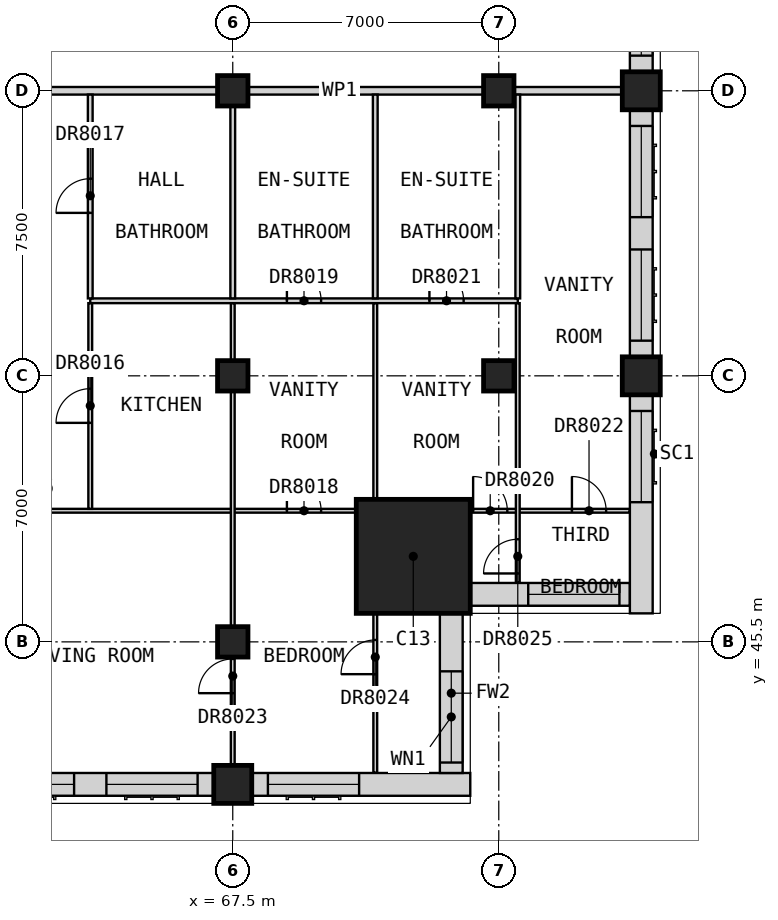
"""IFC4 building model, lengths in metres.
Left out: names, types, materials, properties, quantities, classifications, styles, units other than length and angle.
Written with IfcOpenShell. Run it as: python <this file> out.ifc"""

import sys

from ifc_helpers import new_model, si_unit, direction, frame, frame_2d, origin, origin_2d, place, context, subcontext, project, spatial, rectangle, extrude, element, fill, save


model = new_model("IFC4")
c1 = context("Model", 3, precision=1e-05, world=origin(), true_north=direction((0.0, 1.0)))
c2 = subcontext(c1, "Body", "Model", "MODEL_VIEW")
j1 = project(units=[si_unit("LENGTHUNIT", "METRE"), si_unit("PLANEANGLEUNIT", "RADIAN")], contexts=[c1])
p1 = place(None, origin())
s1 = spatial("IfcSite", under=j1, at=p1, CompositionType="ELEMENT")
p2 = place(p1, origin())
s2 = spatial("IfcBuilding", under=s1, at=p2, CompositionType="ELEMENT")
p3 = place(p2, frame((0.0, 0.0, 233.7)))
s3 = spatial("IfcBuildingStorey", under=s2, at=p3, CompositionType="ELEMENT", Elevation=233.7)
for number, where, z_axis, x_axis in (
    (1, (67.5, 41.75, 0.0), (0.0, 0.0, 1.0), (1.0, 0.0, 0.0)),
    (2, (78.25, 52.5, 0.0), (0.0, 0.0, 1.0), (1.0, 0.0, 0.0)),
    (3, (78.25, 60.0, 0.0), (0.0, 0.0, 1.0), (1.0, 0.0, 0.0)),
):
    element("IfcColumn", number, at=place(p3, frame(where, z_axis=z_axis, x_axis=x_axis)), inside=s3, PredefinedType="COLUMN", context=c2, shape_type="SweptSolid", body=[
        extrude(rectangle(XDim=1.0, YDim=1.0, at=origin_2d()), origin(), (0.0, 0.0, 1.0), 3.5),
    ])
for number, where, z_axis, x_axis in (
    (4, (67.5, 45.5, 0.0), (0.0, 0.0, 1.0), (1.0, 0.0, 0.0)),
    (5, (67.5, 52.5, 0.0), (0.0, 0.0, 1.0), (1.0, 0.0, 0.0)),
    (6, (67.5, 60.0, 0.0), (0.0, 0.0, 1.0), (1.0, 0.0, 0.0)),
    (7, (74.5, 52.5, 0.0), (0.0, 0.0, 1.0), (1.0, 0.0, 0.0)),
    (8, (74.5, 60.0, 0.0), (0.0, 0.0, 1.0), (1.0, 0.0, 0.0)),
):
    element("IfcColumn", number, at=place(p3, frame(where, z_axis=z_axis, x_axis=x_axis)), inside=s3, PredefinedType="COLUMN", context=c2, shape_type="SweptSolid", body=[
        extrude(rectangle(XDim=0.8, YDim=0.8, at=origin_2d()), origin(), (0.0, 0.0, 1.0), 3.5),
    ])
p4 = place(p3, frame((72.25, 47.75, 0.0), z_axis=(0.0, 0.0, 1.0), x_axis=(1.0, 0.0, 0.0)))
e9 = element("IfcColumn", 9, at=p4, inside=s3, PredefinedType="COLUMN", context=c2, shape_type="SweptSolid", body=[
    extrude(rectangle(XDim=3.0, YDim=3.0, at=origin_2d()), origin(), (0.0, 0.0, 1.0), 3.5),
])
p5 = place(p3, frame((60.5, 41.75, 0.0), z_axis=(0.0, 0.0, 1.0), x_axis=(1.0, 0.0, 0.0)))
e10 = element("IfcWall", 10, at=p5, inside=s3, PredefinedType="SOLIDWALL", context=c2, shape_type="SweptSolid", body=[
    extrude(rectangle(XDim=6.5, YDim=0.6, at=frame_2d((3.25, 0.0))), origin(), (0.0, 0.0, 1.0), 2.75),
])
p6 = place(p5, frame((0.425, 0.0, 0.8)))
e11 = element("IfcOpeningElement", 11, at=p6, cuts=e10, PredefinedType="OPENING", context=c2, shape_type="SweptSolid", body=[
    extrude(rectangle(XDim=2.4, YDim=1.8, at=frame_2d((1.2, 0.9))), frame((0.0, 0.31, 0.0), z_axis=(0.0, -1.0, 0.0), x_axis=(1.0, 0.0, 0.0)), (0.0, 0.0, 1.0), 0.62),
])
p7 = place(p5, frame((3.675, 0.0, 0.8)))
e12 = element("IfcOpeningElement", 12, at=p7, cuts=e10, PredefinedType="OPENING", context=c2, shape_type="SweptSolid", body=[
    extrude(rectangle(XDim=2.4, YDim=1.8, at=frame_2d((1.2, 0.9))), frame((0.0, 0.31, 0.0), z_axis=(0.0, -1.0, 0.0), x_axis=(1.0, 0.0, 0.0)), (0.0, 0.0, 1.0), 0.62),
])
p8 = place(p3, frame((68.0, 41.75, 0.0), z_axis=(0.0, 0.0, 1.0), x_axis=(1.0, 0.0, 0.0)))
e13 = element("IfcWall", 13, at=p8, inside=s3, PredefinedType="SOLIDWALL", context=c2, shape_type="SweptSolid", body=[
    extrude(rectangle(XDim=5.75, YDim=0.6, at=frame_2d((2.875, 0.0))), origin(), (0.0, 0.0, 1.0), 2.75),
])
p9 = place(p8, frame((0.425, 0.0, 0.8)))
e14 = element("IfcOpeningElement", 14, at=p9, cuts=e13, PredefinedType="OPENING", context=c2, shape_type="SweptSolid", body=[
    extrude(rectangle(XDim=2.4, YDim=1.8, at=frame_2d((1.2, 0.9))), frame((0.0, 0.31, 0.0), z_axis=(0.0, -1.0, 0.0), x_axis=(1.0, 0.0, 0.0)), (0.0, 0.0, 1.0), 0.62),
])
p10 = place(p3, frame((73.25, 42.05, 0.0), z_axis=(0.0, 0.0, 1.0), x_axis=(0.0, 1.0, 0.0)))
e15 = element("IfcWall", 15, at=p10, inside=s3, PredefinedType="SOLIDWALL", context=c2, shape_type="SweptSolid", body=[
    extrude(rectangle(XDim=4.2, YDim=0.6, at=frame_2d((2.1, 0.0))), origin(), (0.0, 0.0, 1.0), 3.25),
])
p11 = place(p10, frame((0.275, 0.0, 0.8)))
e16 = element("IfcOpeningElement", 16, at=p11, cuts=e15, PredefinedType="OPENING", context=c2, shape_type="SweptSolid", body=[
    extrude(rectangle(XDim=2.4, YDim=1.8, at=frame_2d((1.2, 0.9))), frame((0.0, 0.31, 0.0), z_axis=(0.0, -1.0, 0.0), x_axis=(1.0, 0.0, 0.0)), (0.0, 0.0, 1.0), 0.62),
])
p12 = place(p3, frame((73.75, 46.75, 0.0), z_axis=(0.0, 0.0, 1.0), x_axis=(1.0, 0.0, 0.0)))
e17 = element("IfcWall", 17, at=p12, inside=s3, PredefinedType="SOLIDWALL", context=c2, shape_type="SweptSolid", body=[
    extrude(rectangle(XDim=4.2, YDim=0.6, at=frame_2d((2.1, 0.0))), origin(), (0.0, 0.0, 1.0), 3.25),
])
p13 = place(p12, frame((1.525, 0.0, 0.8)))
e18 = element("IfcOpeningElement", 18, at=p13, cuts=e17, PredefinedType="OPENING", context=c2, shape_type="SweptSolid", body=[
    extrude(rectangle(XDim=2.4, YDim=1.8, at=frame_2d((1.2, 0.9))), frame((0.0, 0.31, 0.0), z_axis=(0.0, -1.0, 0.0), x_axis=(1.0, 0.0, 0.0)), (0.0, 0.0, 1.0), 0.62),
])
p14 = place(p3, frame((78.25, 46.25, 0.0), z_axis=(0.0, 0.0, 1.0), x_axis=(0.0, 1.0, 0.0)))
e19 = element("IfcWall", 19, at=p14, inside=s3, PredefinedType="SOLIDWALL", context=c2, shape_type="SweptSolid", body=[
    extrude(rectangle(XDim=5.75, YDim=0.6, at=frame_2d((2.875, 0.0))), origin(), (0.0, 0.0, 1.0), 2.75),
])
p15 = place(p14, frame((2.925, 0.0, 0.8)))
e20 = element("IfcOpeningElement", 20, at=p15, cuts=e19, PredefinedType="OPENING", context=c2, shape_type="SweptSolid", body=[
    extrude(rectangle(XDim=2.4, YDim=1.8, at=frame_2d((1.2, 0.9))), frame((0.0, 0.31, 0.0), z_axis=(0.0, -1.0, 0.0), x_axis=(1.0, 0.0, 0.0)), (0.0, 0.0, 1.0), 0.62),
])
p16 = place(p3, frame((78.25, 53.0, 0.0), z_axis=(0.0, 0.0, 1.0), x_axis=(0.0, 1.0, 0.0)))
e21 = element("IfcWall", 21, at=p16, inside=s3, PredefinedType="SOLIDWALL", context=c2, shape_type="SweptSolid", body=[
    extrude(rectangle(XDim=6.5, YDim=0.6, at=frame_2d((3.25, 0.0))), origin(), (0.0, 0.0, 1.0), 2.75),
])
p17 = place(p16, frame((0.425, 0.0, 0.8)))
e22 = element("IfcOpeningElement", 22, at=p17, cuts=e21, PredefinedType="OPENING", context=c2, shape_type="SweptSolid", body=[
    extrude(rectangle(XDim=2.4, YDim=1.8, at=frame_2d((1.2, 0.9))), frame((0.0, 0.31, 0.0), z_axis=(0.0, -1.0, 0.0), x_axis=(1.0, 0.0, 0.0)), (0.0, 0.0, 1.0), 0.62),
])
p18 = place(p16, frame((3.675, 0.0, 0.8)))
e23 = element("IfcOpeningElement", 23, at=p18, cuts=e21, PredefinedType="OPENING", context=c2, shape_type="SweptSolid", body=[
    extrude(rectangle(XDim=2.4, YDim=1.8, at=frame_2d((1.2, 0.9))), frame((0.0, 0.31, 0.0), z_axis=(0.0, -1.0, 0.0), x_axis=(1.0, 0.0, 0.0)), (0.0, 0.0, 1.0), 0.62),
])
p19 = place(p3, frame((78.25, 60.5, 0.0), z_axis=(0.0, 0.0, 1.0), x_axis=(0.0, 1.0, 0.0)))
e24 = element("IfcWall", 24, at=p19, inside=s3, PredefinedType="SOLIDWALL", context=c2, shape_type="SweptSolid", body=[
    extrude(rectangle(XDim=6.5, YDim=0.6, at=frame_2d((3.25, 0.0))), origin(), (0.0, 0.0, 1.0), 2.75),
])
p20 = place(p19, frame((0.425, 0.0, 0.8)))
e25 = element("IfcOpeningElement", 25, at=p20, cuts=e24, PredefinedType="OPENING", context=c2, shape_type="SweptSolid", body=[
    extrude(rectangle(XDim=2.4, YDim=1.8, at=frame_2d((1.2, 0.9))), frame((0.0, 0.31, 0.0), z_axis=(0.0, -1.0, 0.0), x_axis=(1.0, 0.0, 0.0)), (0.0, 0.0, 1.0), 0.62),
])
p21 = place(p19, frame((3.675, 0.0, 0.8)))
e26 = element("IfcOpeningElement", 26, at=p21, cuts=e24, PredefinedType="OPENING", context=c2, shape_type="SweptSolid", body=[
    extrude(rectangle(XDim=2.4, YDim=1.8, at=frame_2d((1.2, 0.9))), frame((0.0, 0.31, 0.0), z_axis=(0.0, -1.0, 0.0), x_axis=(1.0, 0.0, 0.0)), (0.0, 0.0, 1.0), 0.62),
])
p22 = place(p3, frame((61.875, 60.0, 0.0), z_axis=(0.0, 0.0, 1.0), x_axis=(1.0, 0.0, 0.0)))
e27 = element("IfcWall", 27, at=p22, inside=s3, PredefinedType="PARTITIONING", context=c2, shape_type="SweptSolid", body=[
    extrude(rectangle(XDim=16.875, YDim=0.2, at=frame_2d((8.438, 0.0))), origin(), (0.0, 0.0, 1.0), 3.25),
])
p23 = place(p3, frame((60.1, 48.95, 0.0), z_axis=(0.0, 0.0, 1.0), x_axis=(1.0, 0.0, 0.0)))
e28 = element("IfcWall", 28, at=p23, inside=s3, PredefinedType="PARTITIONING", context=c2, shape_type="SweptSolid", body=[
    extrude(rectangle(XDim=17.84, YDim=0.1, at=frame_2d((8.92, 0.0))), origin(), (0.0, 0.0, 1.0), 3.25),
])
p24 = place(p23, frame((1.325, 0.0, 0.0)))
e29 = element("IfcOpeningElement", 29, at=p24, cuts=e28, PredefinedType="OPENING", context=c2, shape_type="SweptSolid", body=[
    extrude(rectangle(XDim=0.9, YDim=2.1, at=frame_2d((0.45, 1.05))), frame((0.0, 0.06, 0.0), z_axis=(0.0, -1.0, 0.0), x_axis=(1.0, 0.0, 0.0)), (0.0, 0.0, 1.0), 0.12),
])
p25 = place(p23, frame((8.825, 0.0, 0.0)))
e30 = element("IfcOpeningElement", 30, at=p25, cuts=e28, PredefinedType="OPENING", context=c2, shape_type="SweptSolid", body=[
    extrude(rectangle(XDim=0.9, YDim=2.1, at=frame_2d((0.45, 1.05))), frame((0.0, 0.06, 0.0), z_axis=(0.0, -1.0, 0.0), x_axis=(1.0, 0.0, 0.0)), (0.0, 0.0, 1.0), 0.12),
])
p26 = place(p23, frame((13.725, 0.0, 0.0)))
e31 = element("IfcOpeningElement", 31, at=p26, cuts=e28, PredefinedType="OPENING", context=c2, shape_type="SweptSolid", body=[
    extrude(rectangle(XDim=0.9, YDim=2.1, at=frame_2d((0.45, 1.05))), frame((0.0, 0.06, 0.0), z_axis=(0.0, -1.0, 0.0), x_axis=(1.0, 0.0, 0.0)), (0.0, 0.0, 1.0), 0.12),
])
p27 = place(p23, frame((16.325, 0.0, 0.0)))
e32 = element("IfcOpeningElement", 32, at=p27, cuts=e28, PredefinedType="OPENING", context=c2, shape_type="SweptSolid", body=[
    extrude(rectangle(XDim=0.9, YDim=2.1, at=frame_2d((0.45, 1.05))), frame((0.0, 0.06, 0.0), z_axis=(0.0, -1.0, 0.0), x_axis=(1.0, 0.0, 0.0)), (0.0, 0.0, 1.0), 0.12),
])
p28 = place(p3, frame((63.75, 49.0, 0.0), z_axis=(0.0, 0.0, 1.0), x_axis=(0.0, 1.0, 0.0)))
e33 = element("IfcWall", 33, at=p28, inside=s3, PredefinedType="PARTITIONING", context=c2, shape_type="SweptSolid", body=[
    extrude(rectangle(XDim=5.413, YDim=0.1, at=frame_2d((2.706, 0.0))), origin(), (0.0, 0.0, 1.0), 3.25),
])
p29 = place(p28, frame((2.262, 0.0, 0.0)))
e34 = element("IfcOpeningElement", 34, at=p29, cuts=e33, PredefinedType="OPENING", context=c2, shape_type="SweptSolid", body=[
    extrude(rectangle(XDim=0.9, YDim=2.1, at=frame_2d((0.45, 1.05))), frame((0.0, 0.06, 0.0), z_axis=(0.0, -1.0, 0.0), x_axis=(1.0, 0.0, 0.0)), (0.0, 0.0, 1.0), 0.12),
])
p30 = place(p3, frame((67.5, 41.25, 0.0), z_axis=(0.0, 0.0, 1.0), x_axis=(0.0, 1.0, 0.0)))
e35 = element("IfcWall", 35, at=p30, inside=s3, PredefinedType="PARTITIONING", context=c2, shape_type="SweptSolid", body=[
    extrude(rectangle(XDim=13.163, YDim=0.1, at=frame_2d((6.581, 0.0))), origin(), (0.0, 0.0, 1.0), 3.25),
])
p31 = place(p30, frame((2.9, 0.0, 0.0)))
e36 = element("IfcOpeningElement", 36, at=p31, cuts=e35, PredefinedType="OPENING", context=c2, shape_type="SweptSolid", body=[
    extrude(rectangle(XDim=0.9, YDim=2.1, at=frame_2d((0.45, 1.05))), frame((0.0, 0.06, 0.0), z_axis=(0.0, -1.0, 0.0), x_axis=(1.0, 0.0, 0.0)), (0.0, 0.0, 1.0), 0.12),
])
p32 = place(p3, frame((71.25, 42.06, 0.0), z_axis=(0.0, 0.0, 1.0), x_axis=(0.0, 1.0, 0.0)))
e37 = element("IfcWall", 37, at=p32, inside=s3, PredefinedType="PARTITIONING", context=c2, shape_type="SweptSolid", body=[
    extrude(rectangle(XDim=12.353, YDim=0.1, at=frame_2d((6.176, 0.0))), origin(), (0.0, 0.0, 1.0), 3.25),
])
p33 = place(p32, frame((2.59, 0.0, 0.0)))
e38 = element("IfcOpeningElement", 38, at=p33, cuts=e37, PredefinedType="OPENING", context=c2, shape_type="SweptSolid", body=[
    extrude(rectangle(XDim=0.9, YDim=2.1, at=frame_2d((0.45, 1.05))), frame((0.0, 0.06, 0.0), z_axis=(0.0, -1.0, 0.0), x_axis=(1.0, 0.0, 0.0)), (0.0, 0.0, 1.0), 0.12),
])
p34 = place(p3, frame((75.0, 47.06, 0.0), z_axis=(0.0, 0.0, 1.0), x_axis=(0.0, 1.0, 0.0)))
e39 = element("IfcWall", 39, at=p34, inside=s3, PredefinedType="PARTITIONING", context=c2, shape_type="SweptSolid", body=[
    extrude(rectangle(XDim=7.353, YDim=0.1, at=frame_2d((3.676, 0.0))), origin(), (0.0, 0.0, 1.0), 3.25),
])
p35 = place(p34, frame((0.24, 0.0, 0.0)))
e40 = element("IfcOpeningElement", 40, at=p35, cuts=e39, PredefinedType="OPENING", context=c2, shape_type="SweptSolid", body=[
    extrude(rectangle(XDim=0.9, YDim=2.1, at=frame_2d((0.45, 1.05))), frame((0.0, 0.06, 0.0), z_axis=(0.0, -1.0, 0.0), x_axis=(1.0, 0.0, 0.0)), (0.0, 0.0, 1.0), 0.12),
])
p36 = place(p3, frame((63.75, 54.475, 0.0), z_axis=(0.0, 0.0, 1.0), x_axis=(1.0, 0.0, 0.0)))
e41 = element("IfcWall", 41, at=p36, inside=s3, PredefinedType="PARTITIONING", context=c2, shape_type="SweptSolid", body=[
    extrude(rectangle(XDim=11.25, YDim=0.125, at=frame_2d((5.625, 0.0))), origin(), (0.0, 0.0, 1.0), 3.25),
])
p37 = place(p36, frame((5.175, 0.0, 0.0)))
e42 = element("IfcOpeningElement", 42, at=p37, cuts=e41, PredefinedType="OPENING", context=c2, shape_type="SweptSolid", body=[
    extrude(rectangle(XDim=0.9, YDim=2.1, at=frame_2d((0.45, 1.05))), frame((0.0, 0.073, 0.0), z_axis=(0.0, -1.0, 0.0), x_axis=(1.0, 0.0, 0.0)), (0.0, 0.0, 1.0), 0.145),
])
p38 = place(p36, frame((8.925, 0.0, 0.0)))
e43 = element("IfcOpeningElement", 43, at=p38, cuts=e41, PredefinedType="OPENING", context=c2, shape_type="SweptSolid", body=[
    extrude(rectangle(XDim=0.9, YDim=2.1, at=frame_2d((0.45, 1.05))), frame((0.0, 0.073, 0.0), z_axis=(0.0, -1.0, 0.0), x_axis=(1.0, 0.0, 0.0)), (0.0, 0.0, 1.0), 0.145),
])
p39 = place(p3, frame((63.75, 54.538, 0.0), z_axis=(0.0, 0.0, 1.0), x_axis=(0.0, 1.0, 0.0)))
e44 = element("IfcWall", 44, at=p39, inside=s3, PredefinedType="PARTITIONING", context=c2, shape_type="SweptSolid", body=[
    extrude(rectangle(XDim=5.362, YDim=0.125, at=frame_2d((2.681, 0.0))), origin(), (0.0, 0.0, 1.0), 3.25),
])
p40 = place(p39, frame((2.25, 0.0, 0.0)))
e45 = element("IfcOpeningElement", 45, at=p40, cuts=e44, PredefinedType="OPENING", context=c2, shape_type="SweptSolid", body=[
    extrude(rectangle(XDim=0.9, YDim=2.1, at=frame_2d((0.45, 1.05))), frame((0.0, 0.073, 0.0), z_axis=(0.0, -1.0, 0.0), x_axis=(1.0, 0.0, 0.0)), (0.0, 0.0, 1.0), 0.145),
])
for number, where, z_axis, x_axis in (
    (46, (67.5, 54.538, 0.0), (0.0, 0.0, 1.0), (0.0, 1.0, 0.0)),
    (47, (71.25, 54.538, 0.0), (0.0, 0.0, 1.0), (0.0, 1.0, 0.0)),
    (48, (75.0, 54.538, 0.0), (0.0, 0.0, 1.0), (0.0, 1.0, 0.0)),
):
    element("IfcWall", number, at=place(p3, frame(where, z_axis=z_axis, x_axis=x_axis)), inside=s3, PredefinedType="PARTITIONING", context=c2, shape_type="SweptSolid", body=[
        extrude(rectangle(XDim=5.362, YDim=0.125, at=frame_2d((2.681, 0.0))), origin(), (0.0, 0.0, 1.0), 3.25),
    ])
p41 = place(p6, origin())
e49 = element("IfcWindow", 49, at=p41, inside=s3, PartitioningType="SINGLE_PANEL", PredefinedType="WINDOW", context=c2, shape_type="SweptSolid", body=[
    extrude(rectangle(XDim=2.4, YDim=1.8, at=frame_2d((1.2, 0.9))), frame((0.0, -0.07, 0.0), z_axis=(0.0, -1.0, 0.0), x_axis=(1.0, 0.0, 0.0)), (0.0, 0.0, 1.0), 0.06),
])
fill(e11, e49)
p42 = place(p7, origin())
e50 = element("IfcWindow", 50, at=p42, inside=s3, PartitioningType="SINGLE_PANEL", PredefinedType="WINDOW", context=c2, shape_type="SweptSolid", body=[
    extrude(rectangle(XDim=2.4, YDim=1.8, at=frame_2d((1.2, 0.9))), frame((0.0, -0.07, 0.0), z_axis=(0.0, -1.0, 0.0), x_axis=(1.0, 0.0, 0.0)), (0.0, 0.0, 1.0), 0.06),
])
fill(e12, e50)
p43 = place(p9, origin())
e51 = element("IfcWindow", 51, at=p43, inside=s3, PartitioningType="SINGLE_PANEL", PredefinedType="WINDOW", context=c2, shape_type="SweptSolid", body=[
    extrude(rectangle(XDim=2.4, YDim=1.8, at=frame_2d((1.2, 0.9))), frame((0.0, -0.07, 0.0), z_axis=(0.0, -1.0, 0.0), x_axis=(1.0, 0.0, 0.0)), (0.0, 0.0, 1.0), 0.06),
])
fill(e14, e51)
p44 = place(p11, origin())
e52 = element("IfcWindow", 52, at=p44, inside=s3, PartitioningType="SINGLE_PANEL", PredefinedType="WINDOW", context=c2, shape_type="SweptSolid", body=[
    extrude(rectangle(XDim=2.4, YDim=1.8, at=frame_2d((1.2, 0.9))), frame((0.0, -0.07, 0.0), z_axis=(0.0, -1.0, 0.0), x_axis=(1.0, 0.0, 0.0)), (0.0, 0.0, 1.0), 0.06),
])
fill(e16, e52)
p45 = place(p13, origin())
e53 = element("IfcWindow", 53, at=p45, inside=s3, PartitioningType="SINGLE_PANEL", PredefinedType="WINDOW", context=c2, shape_type="SweptSolid", body=[
    extrude(rectangle(XDim=2.4, YDim=1.8, at=frame_2d((1.2, 0.9))), frame((0.0, -0.07, 0.0), z_axis=(0.0, -1.0, 0.0), x_axis=(1.0, 0.0, 0.0)), (0.0, 0.0, 1.0), 0.06),
])
fill(e18, e53)
p46 = place(p15, origin())
e54 = element("IfcWindow", 54, at=p46, inside=s3, PartitioningType="SINGLE_PANEL", PredefinedType="WINDOW", context=c2, shape_type="SweptSolid", body=[
    extrude(rectangle(XDim=2.4, YDim=1.8, at=frame_2d((1.2, 0.9))), frame((0.0, -0.07, 0.0), z_axis=(0.0, -1.0, 0.0), x_axis=(1.0, 0.0, 0.0)), (0.0, 0.0, 1.0), 0.06),
])
fill(e20, e54)
p47 = place(p17, origin())
e55 = element("IfcWindow", 55, at=p47, inside=s3, PartitioningType="SINGLE_PANEL", PredefinedType="WINDOW", context=c2, shape_type="SweptSolid", body=[
    extrude(rectangle(XDim=2.4, YDim=1.8, at=frame_2d((1.2, 0.9))), frame((0.0, -0.07, 0.0), z_axis=(0.0, -1.0, 0.0), x_axis=(1.0, 0.0, 0.0)), (0.0, 0.0, 1.0), 0.06),
])
fill(e22, e55)
p48 = place(p18, origin())
e56 = element("IfcWindow", 56, at=p48, inside=s3, PartitioningType="SINGLE_PANEL", PredefinedType="WINDOW", context=c2, shape_type="SweptSolid", body=[
    extrude(rectangle(XDim=2.4, YDim=1.8, at=frame_2d((1.2, 0.9))), frame((0.0, -0.07, 0.0), z_axis=(0.0, -1.0, 0.0), x_axis=(1.0, 0.0, 0.0)), (0.0, 0.0, 1.0), 0.06),
])
fill(e23, e56)
p49 = place(p20, origin())
e57 = element("IfcWindow", 57, at=p49, inside=s3, PartitioningType="SINGLE_PANEL", PredefinedType="WINDOW", context=c2, shape_type="SweptSolid", body=[
    extrude(rectangle(XDim=2.4, YDim=1.8, at=frame_2d((1.2, 0.9))), frame((0.0, -0.07, 0.0), z_axis=(0.0, -1.0, 0.0), x_axis=(1.0, 0.0, 0.0)), (0.0, 0.0, 1.0), 0.06),
])
fill(e25, e57)
p50 = place(p29, origin())
e58 = element("IfcDoor", 58, at=p50, inside=s3, OperationType="SINGLE_SWING_RIGHT", PredefinedType="DOOR", context=c2, shape_type="SweptSolid", body=[
    extrude(rectangle(XDim=0.9, YDim=2.1, at=frame_2d((0.45, 1.05))), frame((0.0, 0.025, 0.0), z_axis=(0.0, -1.0, 0.0), x_axis=(1.0, 0.0, 0.0)), (0.0, 0.0, 1.0), 0.05),
])
fill(e34, e58)
p51 = place(p40, origin())
e59 = element("IfcDoor", 59, at=p51, inside=s3, OperationType="SINGLE_SWING_RIGHT", PredefinedType="DOOR", context=c2, shape_type="SweptSolid", body=[
    extrude(rectangle(XDim=0.9, YDim=2.1, at=frame_2d((0.45, 1.05))), frame((0.0, 0.025, 0.0), z_axis=(0.0, -1.0, 0.0), x_axis=(1.0, 0.0, 0.0)), (0.0, 0.0, 1.0), 0.05),
])
fill(e45, e59)
p52 = place(p25, origin())
e60 = element("IfcDoor", 60, at=p52, inside=s3, OperationType="SINGLE_SWING_LEFT", PredefinedType="DOOR", context=c2, shape_type="SweptSolid", body=[
    extrude(rectangle(XDim=0.9, YDim=2.1, at=frame_2d((0.45, 1.05))), frame((0.0, 0.025, 0.0), z_axis=(0.0, -1.0, 0.0), x_axis=(1.0, 0.0, 0.0)), (0.0, 0.0, 1.0), 0.05),
])
fill(e30, e60)
p53 = place(p37, origin())
e61 = element("IfcDoor", 61, at=p53, inside=s3, OperationType="SINGLE_SWING_LEFT", PredefinedType="DOOR", context=c2, shape_type="SweptSolid", body=[
    extrude(rectangle(XDim=0.9, YDim=2.1, at=frame_2d((0.45, 1.05))), frame((0.0, 0.025, 0.0), z_axis=(0.0, -1.0, 0.0), x_axis=(1.0, 0.0, 0.0)), (0.0, 0.0, 1.0), 0.05),
])
fill(e42, e61)
p54 = place(p26, origin())
e62 = element("IfcDoor", 62, at=p54, inside=s3, OperationType="SINGLE_SWING_RIGHT", PredefinedType="DOOR", context=c2, shape_type="SweptSolid", body=[
    extrude(rectangle(XDim=0.9, YDim=2.1, at=frame_2d((0.45, 1.05))), frame((0.0, 0.025, 0.0), z_axis=(0.0, -1.0, 0.0), x_axis=(1.0, 0.0, 0.0)), (0.0, 0.0, 1.0), 0.05),
])
fill(e31, e62)
p55 = place(p38, origin())
e63 = element("IfcDoor", 63, at=p55, inside=s3, OperationType="SINGLE_SWING_LEFT", PredefinedType="DOOR", context=c2, shape_type="SweptSolid", body=[
    extrude(rectangle(XDim=0.9, YDim=2.1, at=frame_2d((0.45, 1.05))), frame((0.0, 0.025, 0.0), z_axis=(0.0, -1.0, 0.0), x_axis=(1.0, 0.0, 0.0)), (0.0, 0.0, 1.0), 0.05),
])
fill(e43, e63)
p56 = place(p27, origin())
e64 = element("IfcDoor", 64, at=p56, inside=s3, OperationType="SINGLE_SWING_LEFT", PredefinedType="DOOR", context=c2, shape_type="SweptSolid", body=[
    extrude(rectangle(XDim=0.9, YDim=2.1, at=frame_2d((0.45, 1.05))), frame((0.0, 0.025, 0.0), z_axis=(0.0, -1.0, 0.0), x_axis=(1.0, 0.0, 0.0)), (0.0, 0.0, 1.0), 0.05),
])
fill(e32, e64)
p57 = place(p31, origin())
e65 = element("IfcDoor", 65, at=p57, inside=s3, OperationType="SINGLE_SWING_LEFT", PredefinedType="DOOR", context=c2, shape_type="SweptSolid", body=[
    extrude(rectangle(XDim=0.9, YDim=2.1, at=frame_2d((0.45, 1.05))), frame((0.0, 0.025, 0.0), z_axis=(0.0, -1.0, 0.0), x_axis=(1.0, 0.0, 0.0)), (0.0, 0.0, 1.0), 0.05),
])
fill(e36, e65)
p58 = place(p33, origin())
e66 = element("IfcDoor", 66, at=p58, inside=s3, OperationType="SINGLE_SWING_LEFT", PredefinedType="DOOR", context=c2, shape_type="SweptSolid", body=[
    extrude(rectangle(XDim=0.9, YDim=2.1, at=frame_2d((0.45, 1.05))), frame((0.0, 0.025, 0.0), z_axis=(0.0, -1.0, 0.0), x_axis=(1.0, 0.0, 0.0)), (0.0, 0.0, 1.0), 0.05),
])
fill(e38, e66)
p59 = place(p35, origin())
e67 = element("IfcDoor", 67, at=p59, inside=s3, OperationType="SINGLE_SWING_RIGHT", PredefinedType="DOOR", context=c2, shape_type="SweptSolid", body=[
    extrude(rectangle(XDim=0.9, YDim=2.1, at=frame_2d((0.45, 1.05))), frame((0.0, 0.025, 0.0), z_axis=(0.0, -1.0, 0.0), x_axis=(1.0, 0.0, 0.0)), (0.0, 0.0, 1.0), 0.05),
])
fill(e40, e67)
save(model, sys.argv[1])
